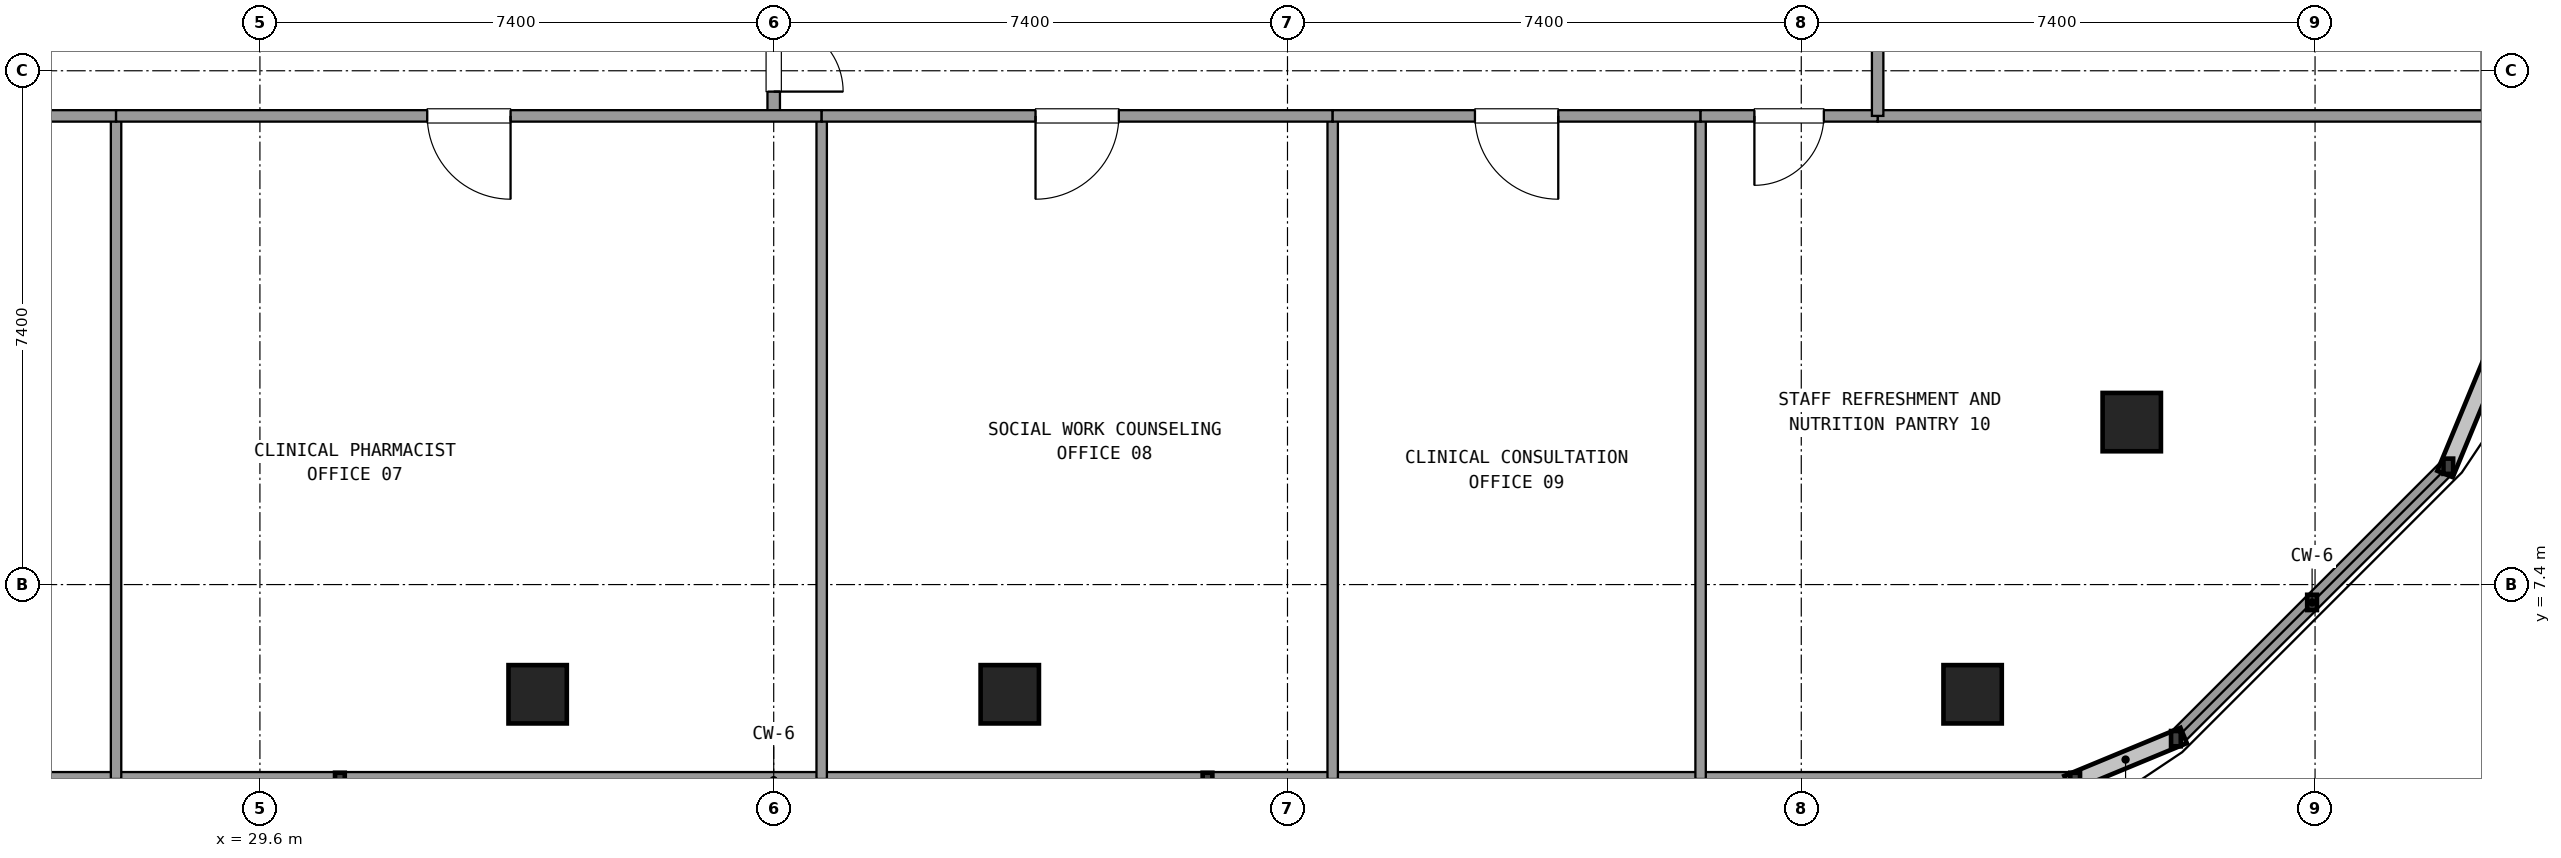
"""IFC4 building model, lengths in metres.
Left out: names, types, materials, properties, quantities, classifications, styles, units other than length and angle.
Written with IfcOpenShell. Run it as: python <this file> out.ifc"""

import sys

from ifc_helpers import new_model, si_unit, direction, frame, frame_2d, origin, origin_2d, place, context, subcontext, project, spatial, rectangle, extrude, element, fill, save


model = new_model("IFC4")
c1 = context("Model", 3, precision=1e-05, world=origin(), true_north=direction((0.0, 1.0)))
c2 = subcontext(c1, "Body", "Model", "MODEL_VIEW")
j1 = project(units=[si_unit("LENGTHUNIT", "METRE"), si_unit("PLANEANGLEUNIT", "RADIAN")], contexts=[c1])
p1 = place(None, origin())
s1 = spatial("IfcSite", under=j1, at=p1, CompositionType="ELEMENT")
p2 = place(p1, origin())
s2 = spatial("IfcBuilding", under=s1, at=p2, CompositionType="ELEMENT")
p3 = place(p2, frame((0.0, 0.0, 246.42)))
s3 = spatial("IfcBuildingStorey", under=s2, at=p3, CompositionType="ELEMENT", Elevation=246.42)
for number, where, z_axis, x_axis in (
    (1, (33.6, 5.82, 0.0), (0.0, 0.0, 1.0), (1.0, 0.0, 0.0)),
    (2, (40.4, 5.82, 0.0), (0.0, 0.0, 1.0), (1.0, 0.0, 0.0)),
    (3, (54.268, 5.82, 0.0), (0.0, 0.0, 1.0), (1.0, 0.0, 0.0)),
    (4, (56.56, 9.74, 0.0), (0.0, 0.0, 1.0), (1.0, 0.0, 0.0)),
):
    element("IfcColumn", number, at=place(p3, frame(where, z_axis=z_axis, x_axis=x_axis)), inside=s3, PredefinedType="COLUMN", context=c2, shape_type="SweptSolid", body=[
        extrude(rectangle(XDim=0.84, YDim=0.84, at=origin_2d()), origin(), (0.0, 0.0, 1.0), 3.6),
    ])
p4 = place(p3, frame((18.255, 4.58, 0.0), z_axis=(0.0, 0.0, 1.0), x_axis=(1.0, 0.0, 0.0)))
e5 = element("IfcWall", 5, at=p4, inside=s3, PredefinedType="SOLIDWALL", context=c2, shape_type="SweptSolid", body=[
    extrude(rectangle(XDim=37.49, YDim=0.24, at=frame_2d((18.745, 0.0))), origin(), (0.0, 0.0, 1.0), 0.85),
])
p5 = place(p3, frame((57.196, 5.181, 0.0), z_axis=(0.0, 0.0, 1.0), x_axis=(0.707084777957, 0.707128783731, 0.0)))
e6 = element("IfcWall", 6, at=p5, inside=s3, PredefinedType="SOLIDWALL", context=c2, shape_type="SweptSolid", body=[
    extrude(rectangle(XDim=5.548, YDim=0.24, at=frame_2d((2.774, 0.0))), origin(), (0.0, 0.0, 1.0), 0.85),
])
p6 = place(p3, frame((61.72, 10.555, 0.0), z_axis=(0.0, 0.0, 1.0), x_axis=(0.0, 1.0, 0.0)))
e7 = element("IfcWall", 7, at=p6, inside=s3, PredefinedType="SOLIDWALL", context=c2, shape_type="SweptSolid", body=[
    extrude(rectangle(XDim=13.805, YDim=0.24, at=frame_2d((6.903, 0.0))), origin(), (0.0, 0.0, 1.0), 0.85),
])
p7 = place(p3, frame((37.0, 14.15, 0.0), z_axis=(0.0, 0.0, 1.0), x_axis=(0.0, 1.0, 0.0)))
e8 = element("IfcWall", 8, at=p7, inside=s3, PredefinedType="PARTITIONING", context=c2, shape_type="SweptSolid", body=[
    extrude(rectangle(XDim=2.7, YDim=0.18, at=frame_2d((1.35, 0.0))), origin(), (0.0, 0.0, 1.0), 2.61),
])
p8 = place(p7, frame((0.35, 0.0, 0.0)))
e9 = element("IfcOpeningElement", 9, at=p8, cuts=e8, PredefinedType="OPENING", context=c2, shape_type="SweptSolid", body=[
    extrude(rectangle(XDim=2.0, YDim=2.2, at=frame_2d((1.0, 1.1))), frame((0.0, 0.1, 0.0), z_axis=(0.0, -1.0, 0.0), x_axis=(1.0, 0.0, 0.0)), (0.0, 0.0, 1.0), 0.2),
])
p9 = place(p3, frame((52.9, 14.15, 0.0), z_axis=(0.0, 0.0, 1.0), x_axis=(1.0, 0.0, 0.0)))
e10 = element("IfcWall", 10, at=p9, inside=s3, PredefinedType="PARTITIONING", context=c2, shape_type="SweptSolid", body=[
    extrude(rectangle(XDim=8.8, YDim=0.165, at=frame_2d((4.4, 0.0))), origin(), (0.0, 0.0, 1.0), 2.61),
])
p10 = place(p3, frame((27.528, 14.15, 0.0), z_axis=(0.0, 0.0, 1.0), x_axis=(0.0, -1.0, 0.0)))
e11 = element("IfcWall", 11, at=p10, inside=s3, PredefinedType="PARTITIONING", context=c2, shape_type="SweptSolid", body=[
    extrude(rectangle(XDim=9.55, YDim=0.15, at=frame_2d((4.775, 0.0))), origin(), (0.0, 0.0, 1.0), 2.61),
])
p11 = place(p3, frame((21.1, 14.15, 0.0), z_axis=(0.0, 0.0, 1.0), x_axis=(1.0, 0.0, 0.0)))
e12 = element("IfcWall", 12, at=p11, inside=s3, PredefinedType="PARTITIONING", context=c2, shape_type="SweptSolid", body=[
    extrude(rectangle(XDim=6.428, YDim=0.165, at=frame_2d((3.214, 0.0))), origin(), (0.0, 0.0, 1.0), 2.61),
])
p12 = place(p11, frame((2.614, 0.0, 0.0)))
e13 = element("IfcOpeningElement", 13, at=p12, cuts=e12, PredefinedType="OPENING", context=c2, shape_type="SweptSolid", body=[
    extrude(rectangle(XDim=1.2, YDim=2.15, at=frame_2d((0.6, 1.075))), frame((0.0, 0.093, 0.0), z_axis=(0.0, -1.0, 0.0), x_axis=(1.0, 0.0, 0.0)), (0.0, 0.0, 1.0), 0.185),
])
p13 = place(p3, frame((37.691, 14.15, 0.0), z_axis=(0.0, 0.0, 1.0), x_axis=(0.0, -1.0, 0.0)))
e14 = element("IfcWall", 14, at=p13, inside=s3, PredefinedType="PARTITIONING", context=c2, shape_type="SweptSolid", body=[
    extrude(rectangle(XDim=9.55, YDim=0.15, at=frame_2d((4.775, 0.0))), origin(), (0.0, 0.0, 1.0), 2.61),
])
p14 = place(p3, frame((27.528, 14.15, 0.0), z_axis=(0.0, 0.0, 1.0), x_axis=(1.0, 0.0, 0.0)))
e15 = element("IfcWall", 15, at=p14, inside=s3, PredefinedType="PARTITIONING", context=c2, shape_type="SweptSolid", body=[
    extrude(rectangle(XDim=10.163, YDim=0.165, at=frame_2d((5.082, 0.0))), origin(), (0.0, 0.0, 1.0), 2.61),
])
p15 = place(p14, frame((4.482, 0.0, 0.0)))
e16 = element("IfcOpeningElement", 16, at=p15, cuts=e15, PredefinedType="OPENING", context=c2, shape_type="SweptSolid", body=[
    extrude(rectangle(XDim=1.2, YDim=2.15, at=frame_2d((0.6, 1.075))), frame((0.0, 0.093, 0.0), z_axis=(0.0, -1.0, 0.0), x_axis=(1.0, 0.0, 0.0)), (0.0, 0.0, 1.0), 0.185),
])
p16 = place(p3, frame((45.051, 14.15, 0.0), z_axis=(0.0, 0.0, 1.0), x_axis=(0.0, -1.0, 0.0)))
e17 = element("IfcWall", 17, at=p16, inside=s3, PredefinedType="PARTITIONING", context=c2, shape_type="SweptSolid", body=[
    extrude(rectangle(XDim=9.55, YDim=0.15, at=frame_2d((4.775, 0.0))), origin(), (0.0, 0.0, 1.0), 2.61),
])
p17 = place(p3, frame((37.691, 14.15, 0.0), z_axis=(0.0, 0.0, 1.0), x_axis=(1.0, 0.0, 0.0)))
e18 = element("IfcWall", 18, at=p17, inside=s3, PredefinedType="PARTITIONING", context=c2, shape_type="SweptSolid", body=[
    extrude(rectangle(XDim=7.36, YDim=0.165, at=frame_2d((3.68, 0.0))), origin(), (0.0, 0.0, 1.0), 2.61),
])
p18 = place(p17, frame((3.08, 0.0, 0.0)))
e19 = element("IfcOpeningElement", 19, at=p18, cuts=e18, PredefinedType="OPENING", context=c2, shape_type="SweptSolid", body=[
    extrude(rectangle(XDim=1.2, YDim=2.15, at=frame_2d((0.6, 1.075))), frame((0.0, 0.093, 0.0), z_axis=(0.0, -1.0, 0.0), x_axis=(1.0, 0.0, 0.0)), (0.0, 0.0, 1.0), 0.185),
])
p19 = place(p3, frame((50.35, 14.15, 0.0), z_axis=(0.0, 0.0, 1.0), x_axis=(0.0, -1.0, 0.0)))
e20 = element("IfcWall", 20, at=p19, inside=s3, PredefinedType="PARTITIONING", context=c2, shape_type="SweptSolid", body=[
    extrude(rectangle(XDim=9.55, YDim=0.15, at=frame_2d((4.775, 0.0))), origin(), (0.0, 0.0, 1.0), 2.61),
])
p20 = place(p3, frame((45.051, 14.15, 0.0), z_axis=(0.0, 0.0, 1.0), x_axis=(1.0, 0.0, 0.0)))
e21 = element("IfcWall", 21, at=p20, inside=s3, PredefinedType="PARTITIONING", context=c2, shape_type="SweptSolid", body=[
    extrude(rectangle(XDim=5.299, YDim=0.165, at=frame_2d((2.649, 0.0))), origin(), (0.0, 0.0, 1.0), 2.61),
])
p21 = place(p20, frame((2.049, 0.0, 0.0)))
e22 = element("IfcOpeningElement", 22, at=p21, cuts=e21, PredefinedType="OPENING", context=c2, shape_type="SweptSolid", body=[
    extrude(rectangle(XDim=1.2, YDim=2.15, at=frame_2d((0.6, 1.075))), frame((0.0, 0.093, 0.0), z_axis=(0.0, -1.0, 0.0), x_axis=(1.0, 0.0, 0.0)), (0.0, 0.0, 1.0), 0.185),
])
p22 = place(p3, frame((50.35, 14.15, 0.0), z_axis=(0.0, 0.0, 1.0), x_axis=(1.0, 0.0, 0.0)))
e23 = element("IfcWall", 23, at=p22, inside=s3, PredefinedType="PARTITIONING", context=c2, shape_type="SweptSolid", body=[
    extrude(rectangle(XDim=2.55, YDim=0.165, at=frame_2d((1.275, 0.0))), origin(), (0.0, 0.0, 1.0), 2.61),
])
p23 = place(p22, frame((0.775, 0.0, 0.0)))
e24 = element("IfcOpeningElement", 24, at=p23, cuts=e23, PredefinedType="OPENING", context=c2, shape_type="SweptSolid", body=[
    extrude(rectangle(XDim=1.0, YDim=2.15, at=frame_2d((0.5, 1.075))), frame((0.0, 0.093, 0.0), z_axis=(0.0, -1.0, 0.0), x_axis=(1.0, 0.0, 0.0)), (0.0, 0.0, 1.0), 0.185),
])
p24 = place(p3, frame((52.9, 14.15, 0.0), z_axis=(0.0, 0.0, 1.0), x_axis=(0.0, 1.0, 0.0)))
e25 = element("IfcWall", 25, at=p24, inside=s3, PredefinedType="PARTITIONING", context=c2, shape_type="SweptSolid", body=[
    extrude(rectangle(XDim=9.87, YDim=0.165, at=frame_2d((4.935, 0.0))), origin(), (0.0, 0.0, 1.0), 2.61),
])
p25 = place(p24, frame((4.335, 0.0, 0.0)))
e26 = element("IfcOpeningElement", 26, at=p25, cuts=e25, PredefinedType="OPENING", context=c2, shape_type="SweptSolid", body=[
    extrude(rectangle(XDim=1.2, YDim=2.15, at=frame_2d((0.6, 1.075))), frame((0.0, 0.093, 0.0), z_axis=(0.0, -1.0, 0.0), x_axis=(1.0, 0.0, 0.0)), (0.0, 0.0, 1.0), 0.185),
])
p26 = place(p8, frame((2.0, 0.0, 0.0), z_axis=(0.0, 0.0, 1.0), x_axis=(-1.0, 0.0, 0.0)))
e27 = element("IfcDoor", 27, at=p26, inside=s3, OperationType="DOUBLE_DOOR_SINGLE_SWING", PredefinedType="DOOR", context=c2, shape_type="SweptSolid", body=[
    extrude(rectangle(XDim=2.0, YDim=2.2, at=frame_2d((1.0, 1.1))), frame((0.0, 0.025, 0.0), z_axis=(0.0, -1.0, 0.0), x_axis=(1.0, 0.0, 0.0)), (0.0, 0.0, 1.0), 0.05),
])
fill(e9, e27)
p27 = place(p15, frame((1.2, 0.0, 0.0), z_axis=(0.0, 0.0, 1.0), x_axis=(-1.0, 0.0, 0.0)))
e28 = element("IfcDoor", 28, at=p27, inside=s3, OperationType="SINGLE_SWING_RIGHT", PredefinedType="DOOR", context=c2, shape_type="SweptSolid", body=[
    extrude(rectangle(XDim=1.2, YDim=2.15, at=frame_2d((0.6, 1.075))), frame((0.0, 0.025, 0.0), z_axis=(0.0, -1.0, 0.0), x_axis=(1.0, 0.0, 0.0)), (0.0, 0.0, 1.0), 0.05),
])
fill(e16, e28)
p28 = place(p18, frame((1.2, 0.0, 0.0), z_axis=(0.0, 0.0, 1.0), x_axis=(-1.0, 0.0, 0.0)))
e29 = element("IfcDoor", 29, at=p28, inside=s3, OperationType="SINGLE_SWING_LEFT", PredefinedType="DOOR", context=c2, shape_type="SweptSolid", body=[
    extrude(rectangle(XDim=1.2, YDim=2.15, at=frame_2d((0.6, 1.075))), frame((0.0, 0.025, 0.0), z_axis=(0.0, -1.0, 0.0), x_axis=(1.0, 0.0, 0.0)), (0.0, 0.0, 1.0), 0.05),
])
fill(e19, e29)
p29 = place(p21, frame((1.2, 0.0, 0.0), z_axis=(0.0, 0.0, 1.0), x_axis=(-1.0, 0.0, 0.0)))
e30 = element("IfcDoor", 30, at=p29, inside=s3, OperationType="SINGLE_SWING_RIGHT", PredefinedType="DOOR", context=c2, shape_type="SweptSolid", body=[
    extrude(rectangle(XDim=1.2, YDim=2.15, at=frame_2d((0.6, 1.075))), frame((0.0, 0.025, 0.0), z_axis=(0.0, -1.0, 0.0), x_axis=(1.0, 0.0, 0.0)), (0.0, 0.0, 1.0), 0.05),
])
fill(e22, e30)
p30 = place(p23, frame((1.0, 0.0, 0.0), z_axis=(0.0, 0.0, 1.0), x_axis=(-1.0, 0.0, 0.0)))
e31 = element("IfcDoor", 31, at=p30, inside=s3, OperationType="SINGLE_SWING_LEFT", PredefinedType="DOOR", context=c2, shape_type="SweptSolid", body=[
    extrude(rectangle(XDim=1.0, YDim=2.15, at=frame_2d((0.5, 1.075))), frame((0.0, 0.025, 0.0), z_axis=(0.0, -1.0, 0.0), x_axis=(1.0, 0.0, 0.0)), (0.0, 0.0, 1.0), 0.05),
])
fill(e24, e31)
save(model, sys.argv[1])
